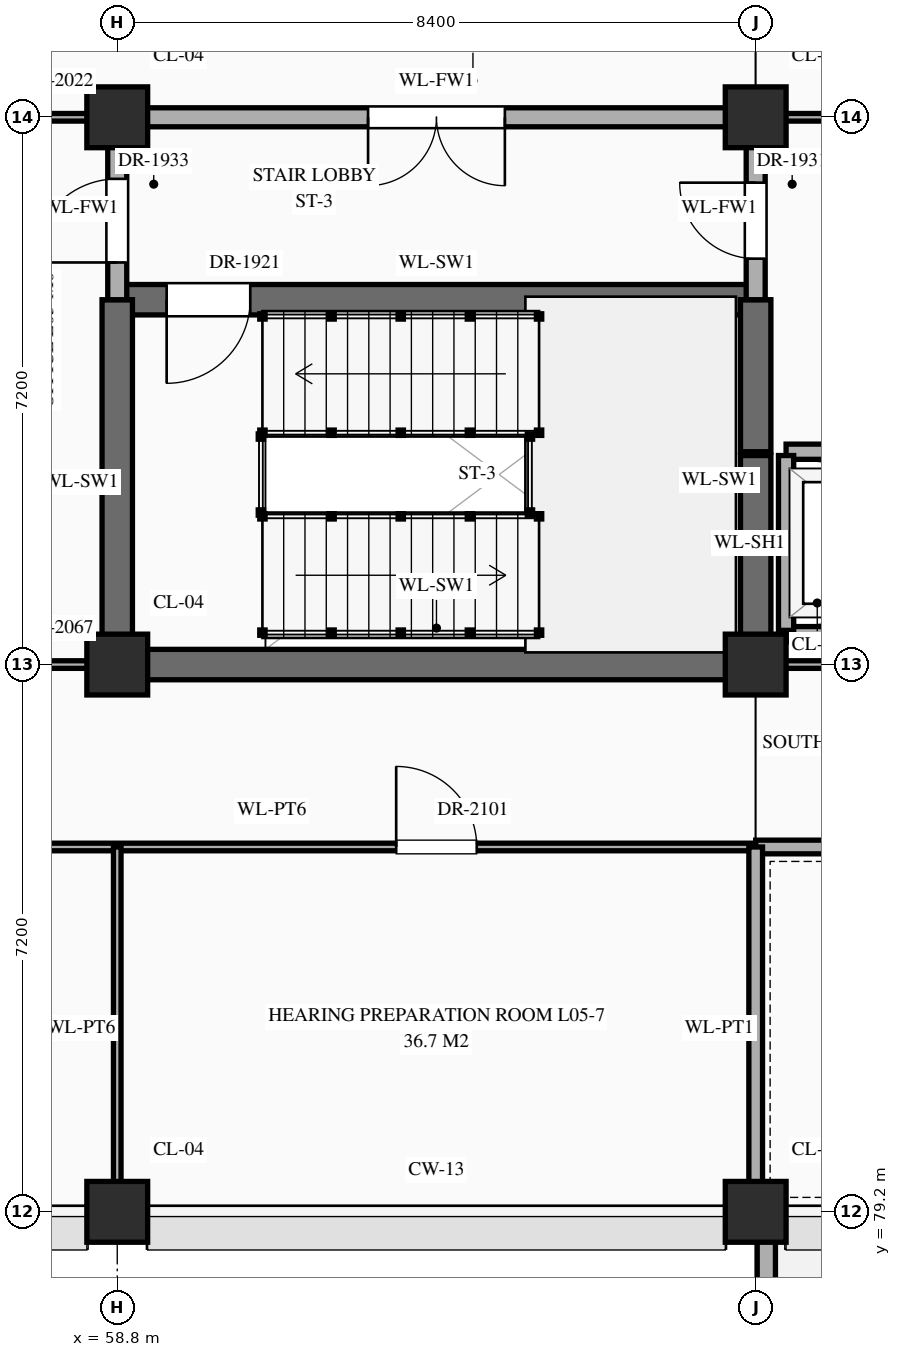
"""IFC4 building model, lengths in metres.
Left out: names, types, materials, properties, quantities, classifications, styles, units other than length and angle.
Written with IfcOpenShell. Run it as: python <this file> out.ifc"""

import sys

from ifc_helpers import new_model, si_unit, direction, frame, frame_2d, origin, origin_2d, place, context, subcontext, project, spatial, rectangle, extrude, element, fill, save


model = new_model("IFC4")
c1 = context("Model", 3, precision=1e-05, world=origin(), true_north=direction((0.0, 1.0)))
c2 = subcontext(c1, "Body", "Model", "MODEL_VIEW")
j1 = project(units=[si_unit("LENGTHUNIT", "METRE"), si_unit("PLANEANGLEUNIT", "RADIAN")], contexts=[c1])
p1 = place(None, origin())
s1 = spatial("IfcSite", under=j1, at=p1, CompositionType="ELEMENT")
p2 = place(p1, origin())
s2 = spatial("IfcBuilding", under=s1, at=p2, CompositionType="ELEMENT")
p3 = place(p2, frame((0.0, 0.0, 21.6)))
s3 = spatial("IfcBuildingStorey", under=s2, at=p3, CompositionType="ELEMENT", Elevation=21.6)
for number, where, z_axis, x_axis in (
    (1, (58.8, 79.2, 0.0), (0.0, 0.0, 1.0), (1.0, 0.0, 0.0)),
    (2, (58.8, 86.4, 0.0), (0.0, 0.0, 1.0), (1.0, 0.0, 0.0)),
    (3, (58.8, 93.6, 0.0), (0.0, 0.0, 1.0), (1.0, 0.0, 0.0)),
    (4, (67.2, 79.2, 0.0), (0.0, 0.0, 1.0), (1.0, 0.0, 0.0)),
    (5, (67.2, 86.4, 0.0), (0.0, 0.0, 1.0), (1.0, 0.0, 0.0)),
    (6, (67.2, 93.6, 0.0), (0.0, 0.0, 1.0), (1.0, 0.0, 0.0)),
):
    element("IfcColumn", number, at=place(p3, frame(where, z_axis=z_axis, x_axis=x_axis)), inside=s3, PredefinedType="COLUMN", context=c2, shape_type="SweptSolid", body=[
        extrude(rectangle(XDim=0.8, YDim=0.8, at=origin_2d()), origin(), (0.0, 0.0, 1.0), 4.5),
    ])
p4 = place(p3, frame((67.34, 78.9, 0.0), z_axis=(0.0, 0.0, 1.0), x_axis=(0.0, -1.0, 0.0)))
e7 = element("IfcWall", 7, at=p4, inside=s3, PredefinedType="PARAPET", context=c2, shape_type="SweptSolid", body=[
    extrude(rectangle(XDim=13.96, YDim=0.24, at=frame_2d((6.98, 0.0))), origin(), (0.0, 0.0, 1.0), 1.2),
])
p5 = place(p3, frame((50.4, 84.0, 0.0), z_axis=(0.0, 0.0, 1.0), x_axis=(1.0, 0.0, 0.0)))
e8 = element("IfcWall", 8, at=p5, inside=s3, PredefinedType="STANDARD", context=c2, shape_type="SweptSolid", body=[
    extrude(rectangle(XDim=16.8, YDim=0.1, at=frame_2d((8.4, 0.0))), origin(), (0.0, 0.0, 1.0), 4.24),
])
p6 = place(p5, frame((3.69, 0.0, 0.0)))
e9 = element("IfcOpeningElement", 9, at=p6, cuts=e8, PredefinedType="OPENING", context=c2, shape_type="SweptSolid", body=[
    extrude(rectangle(XDim=1.02, YDim=2.4, at=frame_2d((0.51, 1.2))), frame((0.0, 0.062, 0.0), z_axis=(0.0, -1.0, 0.0), x_axis=(1.0, 0.0, 0.0)), (0.0, 0.0, 1.0), 0.124),
])
p7 = place(p5, frame((12.07, 0.0, 0.0)))
e10 = element("IfcOpeningElement", 10, at=p7, cuts=e8, PredefinedType="OPENING", context=c2, shape_type="SweptSolid", body=[
    extrude(rectangle(XDim=1.06, YDim=2.4, at=frame_2d((0.53, 1.2))), frame((0.0, 0.062, 0.0), z_axis=(0.0, -1.0, 0.0), x_axis=(1.0, 0.0, 0.0)), (0.0, 0.0, 1.0), 0.124),
])
p8 = place(p3, frame((67.2, 84.0, 0.0), z_axis=(0.0, 0.0, 1.0), x_axis=(1.0, 0.0, 0.0)))
e11 = element("IfcWall", 11, at=p8, inside=s3, PredefinedType="STANDARD", context=c2, shape_type="SweptSolid", body=[
    extrude(rectangle(XDim=33.6, YDim=0.18, at=frame_2d((16.8, 0.0))), origin(), (0.0, 0.0, 1.0), 4.24),
])
p9 = place(p8, frame((7.575, 0.0, 0.0)))
e12 = element("IfcOpeningElement", 12, at=p9, cuts=e11, PredefinedType="OPENING", context=c2, shape_type="SweptSolid", body=[
    extrude(rectangle(XDim=1.65, YDim=2.4, at=frame_2d((0.825, 1.2))), frame((0.0, 0.102, 0.0), z_axis=(0.0, -1.0, 0.0), x_axis=(1.0, 0.0, 0.0)), (0.0, 0.0, 1.0), 0.204),
])
p10 = place(p8, frame((24.35, 0.0, 0.0)))
e13 = element("IfcOpeningElement", 13, at=p10, cuts=e11, PredefinedType="OPENING", context=c2, shape_type="SweptSolid", body=[
    extrude(rectangle(XDim=1.7, YDim=2.45, at=frame_2d((0.85, 1.225))), frame((0.0, 0.102, 0.0), z_axis=(0.0, -1.0, 0.0), x_axis=(1.0, 0.0, 0.0)), (0.0, 0.0, 1.0), 0.204),
])
p11 = place(p3, frame((50.4, 86.4, 0.0), z_axis=(0.0, 0.0, 1.0), x_axis=(1.0, 0.0, 0.0)))
e14 = element("IfcWall", 14, at=p11, inside=s3, PredefinedType="STANDARD", context=c2, shape_type="SweptSolid", body=[
    extrude(rectangle(XDim=8.4, YDim=0.1, at=frame_2d((4.2, 0.0))), origin(), (0.0, 0.0, 1.0), 3.39),
])
p12 = place(p11, frame((1.09, 0.0, 0.0)))
e15 = element("IfcOpeningElement", 15, at=p12, cuts=e14, PredefinedType="OPENING", context=c2, shape_type="SweptSolid", body=[
    extrude(rectangle(XDim=0.94, YDim=2.3, at=frame_2d((0.47, 1.15))), frame((0.0, 0.062, 0.0), z_axis=(0.0, -1.0, 0.0), x_axis=(1.0, 0.0, 0.0)), (0.0, 0.0, 1.0), 0.124),
])
p13 = place(p11, frame((3.69, 0.0, 0.0)))
e16 = element("IfcOpeningElement", 16, at=p13, cuts=e14, PredefinedType="OPENING", context=c2, shape_type="SweptSolid", body=[
    extrude(rectangle(XDim=1.02, YDim=2.4, at=frame_2d((0.51, 1.2))), frame((0.0, 0.062, 0.0), z_axis=(0.0, -1.0, 0.0), x_axis=(1.0, 0.0, 0.0)), (0.0, 0.0, 1.0), 0.124),
])
p14 = place(p11, frame((6.31, 0.0, 0.0)))
e17 = element("IfcOpeningElement", 17, at=p14, cuts=e14, PredefinedType="OPENING", context=c2, shape_type="SweptSolid", body=[
    extrude(rectangle(XDim=1.06, YDim=2.4, at=frame_2d((0.53, 1.2))), frame((0.0, 0.062, 0.0), z_axis=(0.0, -1.0, 0.0), x_axis=(1.0, 0.0, 0.0)), (0.0, 0.0, 1.0), 0.124),
])
p15 = place(p3, frame((58.8, 86.4, 0.0), z_axis=(0.0, 0.0, 1.0), x_axis=(1.0, 0.0, 0.0)))
e18 = element("IfcWall", 18, at=p15, inside=s3, PredefinedType="SHEAR", context=c2, shape_type="SweptSolid", body=[
    extrude(rectangle(XDim=8.4, YDim=0.4, at=frame_2d((4.2, 0.0))), origin(), (0.0, 0.0, 1.0), 4.24),
])
p16 = place(p3, frame((67.25, 86.4, 0.0), z_axis=(0.0, 0.0, 1.0), x_axis=(1.0, 0.0, 0.0)))
e19 = element("IfcWall", 19, at=p16, inside=s3, PredefinedType="STANDARD", context=c2, shape_type="SweptSolid", body=[
    extrude(rectangle(XDim=8.3, YDim=0.1, at=frame_2d((4.15, 0.0))), origin(), (0.0, 0.0, 1.0), 3.39),
])
p17 = place(p3, frame((67.6, 86.8, 0.0), z_axis=(0.0, 0.0, 1.0), x_axis=(1.0, 0.0, 0.0)))
e20 = element("IfcWall", 20, at=p17, inside=s3, PredefinedType="STANDARD", context=c2, shape_type="SweptSolid", body=[
    extrude(rectangle(XDim=2.5, YDim=0.2, at=frame_2d((1.25, 0.0))), origin(), (0.0, 0.0, 1.0), 4.24),
])
p18 = place(p3, frame((67.6, 89.2, 0.0), z_axis=(0.0, 0.0, 1.0), x_axis=(1.0, 0.0, 0.0)))
e21 = element("IfcWall", 21, at=p18, inside=s3, PredefinedType="STANDARD", context=c2, shape_type="SweptSolid", body=[
    extrude(rectangle(XDim=7.7, YDim=0.2, at=frame_2d((3.85, 0.0))), origin(), (0.0, 0.0, 1.0), 4.24),
])
p19 = place(p18, frame((0.725, 0.0, 0.0)))
e22 = element("IfcOpeningElement", 22, at=p19, cuts=e21, PredefinedType="OPENING", context=c2, shape_type="SweptSolid", body=[
    extrude(rectangle(XDim=1.1, YDim=2.15, at=frame_2d((0.55, 1.075))), frame((0.0, 0.112, 0.0), z_axis=(0.0, -1.0, 0.0), x_axis=(1.0, 0.0, 0.0)), (0.0, 0.0, 1.0), 0.224),
])
p20 = place(p18, frame((3.3, 0.0, 0.0)))
e23 = element("IfcOpeningElement", 23, at=p20, cuts=e21, PredefinedType="OPENING", context=c2, shape_type="SweptSolid", body=[
    extrude(rectangle(XDim=1.1, YDim=2.15, at=frame_2d((0.55, 1.075))), frame((0.0, 0.112, 0.0), z_axis=(0.0, -1.0, 0.0), x_axis=(1.0, 0.0, 0.0)), (0.0, 0.0, 1.0), 0.224),
])
p21 = place(p18, frame((5.875, 0.0, 0.0)))
e24 = element("IfcOpeningElement", 24, at=p21, cuts=e21, PredefinedType="OPENING", context=c2, shape_type="SweptSolid", body=[
    extrude(rectangle(XDim=1.1, YDim=2.15, at=frame_2d((0.55, 1.075))), frame((0.0, 0.112, 0.0), z_axis=(0.0, -1.0, 0.0), x_axis=(1.0, 0.0, 0.0)), (0.0, 0.0, 1.0), 0.224),
])
p22 = place(p3, frame((58.8, 91.2, 0.0), z_axis=(0.0, 0.0, 1.0), x_axis=(1.0, 0.0, 0.0)))
e25 = element("IfcWall", 25, at=p22, inside=s3, PredefinedType="SHEAR", context=c2, shape_type="SweptSolid", body=[
    extrude(rectangle(XDim=8.4, YDim=0.4, at=frame_2d((4.2, 0.0))), origin(), (0.0, 0.0, 1.0), 4.24),
])
p23 = place(p22, frame((0.65, 0.0, 0.0)))
e26 = element("IfcOpeningElement", 26, at=p23, cuts=e25, PredefinedType="OPENING", context=c2, shape_type="SweptSolid", body=[
    extrude(rectangle(XDim=1.1, YDim=2.2, at=frame_2d((0.55, 1.1))), frame((0.0, 0.212, 0.0), z_axis=(0.0, -1.0, 0.0), x_axis=(1.0, 0.0, 0.0)), (0.0, 0.0, 1.0), 0.424),
])
p24 = place(p3, frame((50.4, 93.6, 0.0), z_axis=(0.0, 0.0, 1.0), x_axis=(1.0, 0.0, 0.0)))
e27 = element("IfcWall", 27, at=p24, inside=s3, PredefinedType="STANDARD", context=c2, shape_type="SweptSolid", body=[
    extrude(rectangle(XDim=8.4, YDim=0.1, at=frame_2d((4.2, 0.0))), origin(), (0.0, 0.0, 1.0), 3.39),
])
p25 = place(p24, frame((1.1, 0.0, 0.0)))
e28 = element("IfcOpeningElement", 28, at=p25, cuts=e27, PredefinedType="OPENING", context=c2, shape_type="SweptSolid", body=[
    extrude(rectangle(XDim=0.92, YDim=2.15, at=frame_2d((0.46, 1.075))), frame((0.0, 0.062, 0.0), z_axis=(0.0, -1.0, 0.0), x_axis=(1.0, 0.0, 0.0)), (0.0, 0.0, 1.0), 0.124),
])
p26 = place(p24, frame((3.72, 0.0, 0.0)))
e29 = element("IfcOpeningElement", 29, at=p26, cuts=e27, PredefinedType="OPENING", context=c2, shape_type="SweptSolid", body=[
    extrude(rectangle(XDim=0.96, YDim=2.2, at=frame_2d((0.48, 1.1))), frame((0.0, 0.062, 0.0), z_axis=(0.0, -1.0, 0.0), x_axis=(1.0, 0.0, 0.0)), (0.0, 0.0, 1.0), 0.124),
])
p27 = place(p24, frame((6.34, 0.0, 0.0)))
e30 = element("IfcOpeningElement", 30, at=p27, cuts=e27, PredefinedType="OPENING", context=c2, shape_type="SweptSolid", body=[
    extrude(rectangle(XDim=1.0, YDim=2.25, at=frame_2d((0.5, 1.125))), frame((0.0, 0.062, 0.0), z_axis=(0.0, -1.0, 0.0), x_axis=(1.0, 0.0, 0.0)), (0.0, 0.0, 1.0), 0.124),
])
p28 = place(p3, frame((58.8, 93.6, 0.0), z_axis=(0.0, 0.0, 1.0), x_axis=(1.0, 0.0, 0.0)))
e31 = element("IfcWall", 31, at=p28, inside=s3, PredefinedType="STANDARD", context=c2, shape_type="SweptSolid", body=[
    extrude(rectangle(XDim=8.4, YDim=0.25, at=frame_2d((4.2, 0.0))), origin(), (0.0, 0.0, 1.0), 3.39),
])
p29 = place(p28, frame((3.3, 0.0, 0.0)))
e32 = element("IfcOpeningElement", 32, at=p29, cuts=e31, PredefinedType="OPENING", context=c2, shape_type="SweptSolid", body=[
    extrude(rectangle(XDim=1.8, YDim=2.35, at=frame_2d((0.9, 1.175))), frame((0.0, 0.137, 0.0), z_axis=(0.0, -1.0, 0.0), x_axis=(1.0, 0.0, 0.0)), (0.0, 0.0, 1.0), 0.274),
])
p30 = place(p3, frame((67.2, 93.6, 0.0), z_axis=(0.0, 0.0, 1.0), x_axis=(1.0, 0.0, 0.0)))
e33 = element("IfcWall", 33, at=p30, inside=s3, PredefinedType="STANDARD", context=c2, shape_type="SweptSolid", body=[
    extrude(rectangle(XDim=33.6, YDim=0.1, at=frame_2d((16.8, 0.0))), origin(), (0.0, 0.0, 1.0), 3.39),
])
p31 = place(p30, frame((3.425, 0.0, 0.0)))
e34 = element("IfcOpeningElement", 34, at=p31, cuts=e33, PredefinedType="OPENING", context=c2, shape_type="SweptSolid", body=[
    extrude(rectangle(XDim=1.55, YDim=2.35, at=frame_2d((0.775, 1.175))), frame((0.0, 0.062, 0.0), z_axis=(0.0, -1.0, 0.0), x_axis=(1.0, 0.0, 0.0)), (0.0, 0.0, 1.0), 0.124),
])
p32 = place(p30, frame((28.55, 0.0, 0.0)))
e35 = element("IfcOpeningElement", 35, at=p32, cuts=e33, PredefinedType="OPENING", context=c2, shape_type="SweptSolid", body=[
    extrude(rectangle(XDim=1.7, YDim=2.45, at=frame_2d((0.85, 1.225))), frame((0.0, 0.062, 0.0), z_axis=(0.0, -1.0, 0.0), x_axis=(1.0, 0.0, 0.0)), (0.0, 0.0, 1.0), 0.124),
])
p33 = place(p30, frame((11.825, 0.0, 0.0)))
e36 = element("IfcOpeningElement", 36, at=p33, cuts=e33, PredefinedType="OPENING", context=c2, shape_type="SweptSolid", body=[
    extrude(rectangle(XDim=1.55, YDim=2.35, at=frame_2d((0.775, 1.175))), frame((0.0, 0.062, 0.0), z_axis=(0.0, -1.0, 0.0), x_axis=(1.0, 0.0, 0.0)), (0.0, 0.0, 1.0), 0.124),
])
p34 = place(p30, frame((17.85, 0.0, 0.0)))
e37 = element("IfcOpeningElement", 37, at=p34, cuts=e33, PredefinedType="OPENING", context=c2, shape_type="SweptSolid", body=[
    extrude(rectangle(XDim=1.02, YDim=2.4, at=frame_2d((0.51, 1.2))), frame((0.0, 0.062, 0.0), z_axis=(0.0, -1.0, 0.0), x_axis=(1.0, 0.0, 0.0)), (0.0, 0.0, 1.0), 0.124),
])
p35 = place(p30, frame((20.47, 0.0, 0.0)))
e38 = element("IfcOpeningElement", 38, at=p35, cuts=e33, PredefinedType="OPENING", context=c2, shape_type="SweptSolid", body=[
    extrude(rectangle(XDim=1.06, YDim=2.4, at=frame_2d((0.53, 1.2))), frame((0.0, 0.062, 0.0), z_axis=(0.0, -1.0, 0.0), x_axis=(1.0, 0.0, 0.0)), (0.0, 0.0, 1.0), 0.124),
])
p36 = place(p30, frame((23.07, 0.0, 0.0)))
e39 = element("IfcOpeningElement", 39, at=p36, cuts=e33, PredefinedType="OPENING", context=c2, shape_type="SweptSolid", body=[
    extrude(rectangle(XDim=1.14, YDim=2.4, at=frame_2d((0.57, 1.2))), frame((0.0, 0.062, 0.0), z_axis=(0.0, -1.0, 0.0), x_axis=(1.0, 0.0, 0.0)), (0.0, 0.0, 1.0), 0.124),
])
p37 = place(p3, frame((58.8, 79.24, 0.0), z_axis=(0.0, 0.0, 1.0), x_axis=(0.0, 1.0, 0.0)))
e40 = element("IfcWall", 40, at=p37, inside=s3, PredefinedType="STANDARD", context=c2, shape_type="SweptSolid", body=[
    extrude(rectangle(XDim=4.76, YDim=0.1, at=frame_2d((2.38, 0.0))), origin(), (0.0, 0.0, 1.0), 3.49),
])
p38 = place(p3, frame((58.8, 86.4, 0.0), z_axis=(0.0, 0.0, 1.0), x_axis=(0.0, 1.0, 0.0)))
e41 = element("IfcWall", 41, at=p38, inside=s3, PredefinedType="SHEAR", context=c2, shape_type="SweptSolid", body=[
    extrude(rectangle(XDim=4.8, YDim=0.4, at=frame_2d((2.4, 0.0))), origin(), (0.0, 0.0, 1.0), 4.24),
])
p39 = place(p3, frame((58.8, 91.2, 0.0), z_axis=(0.0, 0.0, 1.0), x_axis=(0.0, 1.0, 0.0)))
e42 = element("IfcWall", 42, at=p39, inside=s3, PredefinedType="STANDARD", context=c2, shape_type="SweptSolid", body=[
    extrude(rectangle(XDim=2.4, YDim=0.25, at=frame_2d((1.2, 0.0))), origin(), (0.0, 0.0, 1.0), 3.49),
])
p40 = place(p39, frame((0.49, 0.0, 0.0)))
e43 = element("IfcOpeningElement", 43, at=p40, cuts=e42, PredefinedType="OPENING", context=c2, shape_type="SweptSolid", body=[
    extrude(rectangle(XDim=1.1, YDim=2.2, at=frame_2d((0.55, 1.1))), frame((0.0, 0.137, 0.0), z_axis=(0.0, -1.0, 0.0), x_axis=(1.0, 0.0, 0.0)), (0.0, 0.0, 1.0), 0.274),
])
p41 = place(p3, frame((67.2, 79.24, 0.0), z_axis=(0.0, 0.0, 1.0), x_axis=(0.0, 1.0, 0.0)))
e44 = element("IfcWall", 44, at=p41, inside=s3, PredefinedType="STANDARD", context=c2, shape_type="SweptSolid", body=[
    extrude(rectangle(XDim=4.76, YDim=0.18, at=frame_2d((2.38, 0.0))), origin(), (0.0, 0.0, 1.0), 3.49),
])
p42 = place(p3, frame((67.2, 86.45, 0.0), z_axis=(0.0, 0.0, 1.0), x_axis=(0.0, 1.0, 0.0)))
e45 = element("IfcWall", 45, at=p42, inside=s3, PredefinedType="SHEAR", context=c2, shape_type="SweptSolid", body=[
    extrude(rectangle(XDim=2.7, YDim=0.4, at=frame_2d((1.35, 0.0))), origin(), (0.0, 0.0, 1.0), 4.24),
])
p43 = place(p3, frame((67.2, 89.2, 0.0), z_axis=(0.0, 0.0, 1.0), x_axis=(0.0, 1.0, 0.0)))
e46 = element("IfcWall", 46, at=p43, inside=s3, PredefinedType="SHEAR", context=c2, shape_type="SweptSolid", body=[
    extrude(rectangle(XDim=2.0, YDim=0.4, at=frame_2d((1.0, 0.0))), origin(), (0.0, 0.0, 1.0), 4.24),
])
p44 = place(p3, frame((67.2, 91.2, 0.0), z_axis=(0.0, 0.0, 1.0), x_axis=(0.0, 1.0, 0.0)))
e47 = element("IfcWall", 47, at=p44, inside=s3, PredefinedType="STANDARD", context=c2, shape_type="SweptSolid", body=[
    extrude(rectangle(XDim=2.4, YDim=0.25, at=frame_2d((1.2, 0.0))), origin(), (0.0, 0.0, 1.0), 3.49),
])
p45 = place(p44, frame((0.54, 0.0, 0.0)))
e48 = element("IfcOpeningElement", 48, at=p45, cuts=e47, PredefinedType="OPENING", context=c2, shape_type="SweptSolid", body=[
    extrude(rectangle(XDim=1.0, YDim=2.2, at=frame_2d((0.5, 1.1))), frame((0.0, 0.137, 0.0), z_axis=(0.0, -1.0, 0.0), x_axis=(1.0, 0.0, 0.0)), (0.0, 0.0, 1.0), 0.274),
])
p46 = place(p3, frame((67.6, 86.85, 0.0), z_axis=(0.0, 0.0, 1.0), x_axis=(0.0, 1.0, 0.0)))
e49 = element("IfcWall", 49, at=p46, inside=s3, PredefinedType="STANDARD", context=c2, shape_type="SweptSolid", body=[
    extrude(rectangle(XDim=2.3, YDim=0.2, at=frame_2d((1.15, 0.0))), origin(), (0.0, 0.0, 1.0), 4.24),
])
p47 = place(p23, frame((1.1, 0.0, 0.0), z_axis=(0.0, 0.0, 1.0), x_axis=(-1.0, 0.0, 0.0)))
e50 = element("IfcDoor", 50, at=p47, inside=s3, OperationType="SINGLE_SWING_RIGHT", PredefinedType="DOOR", context=c2, shape_type="SweptSolid", body=[
    extrude(rectangle(XDim=1.1, YDim=2.2, at=frame_2d((0.55, 1.1))), frame((0.0, 0.025, 0.0), z_axis=(0.0, -1.0, 0.0), x_axis=(1.0, 0.0, 0.0)), (0.0, 0.0, 1.0), 0.05),
])
fill(e26, e50)
p48 = place(p45, origin())
e51 = element("IfcDoor", 51, at=p48, inside=s3, OperationType="SINGLE_SWING_RIGHT", PredefinedType="DOOR", context=c2, shape_type="SweptSolid", body=[
    extrude(rectangle(XDim=1.0, YDim=2.2, at=frame_2d((0.5, 1.1))), frame((0.0, 0.025, 0.0), z_axis=(0.0, -1.0, 0.0), x_axis=(1.0, 0.0, 0.0)), (0.0, 0.0, 1.0), 0.05),
])
fill(e48, e51)
p49 = place(p29, frame((1.8, 0.0, 0.0), z_axis=(0.0, 0.0, 1.0), x_axis=(-1.0, 0.0, 0.0)))
e52 = element("IfcDoor", 52, at=p49, inside=s3, OperationType="DOUBLE_DOOR_SINGLE_SWING", PredefinedType="DOOR", context=c2, shape_type="SweptSolid", body=[
    extrude(rectangle(XDim=1.8, YDim=2.35, at=frame_2d((0.9, 1.175))), frame((0.0, 0.025, 0.0), z_axis=(0.0, -1.0, 0.0), x_axis=(1.0, 0.0, 0.0)), (0.0, 0.0, 1.0), 0.05),
])
fill(e32, e52)
p50 = place(p40, origin())
e53 = element("IfcDoor", 53, at=p50, inside=s3, OperationType="SINGLE_SWING_LEFT", PredefinedType="DOOR", context=c2, shape_type="SweptSolid", body=[
    extrude(rectangle(XDim=1.1, YDim=2.2, at=frame_2d((0.55, 1.1))), frame((0.0, 0.025, 0.0), z_axis=(0.0, -1.0, 0.0), x_axis=(1.0, 0.0, 0.0)), (0.0, 0.0, 1.0), 0.05),
])
fill(e43, e53)
p51 = place(p7, origin())
e54 = element("IfcDoor", 54, at=p51, inside=s3, OperationType="SINGLE_SWING_LEFT", PredefinedType="DOOR", context=c2, shape_type="SweptSolid", body=[
    extrude(rectangle(XDim=1.06, YDim=2.4, at=frame_2d((0.53, 1.2))), frame((0.0, 0.025, 0.0), z_axis=(0.0, -1.0, 0.0), x_axis=(1.0, 0.0, 0.0)), (0.0, 0.0, 1.0), 0.05),
])
fill(e10, e54)
save(model, sys.argv[1])
